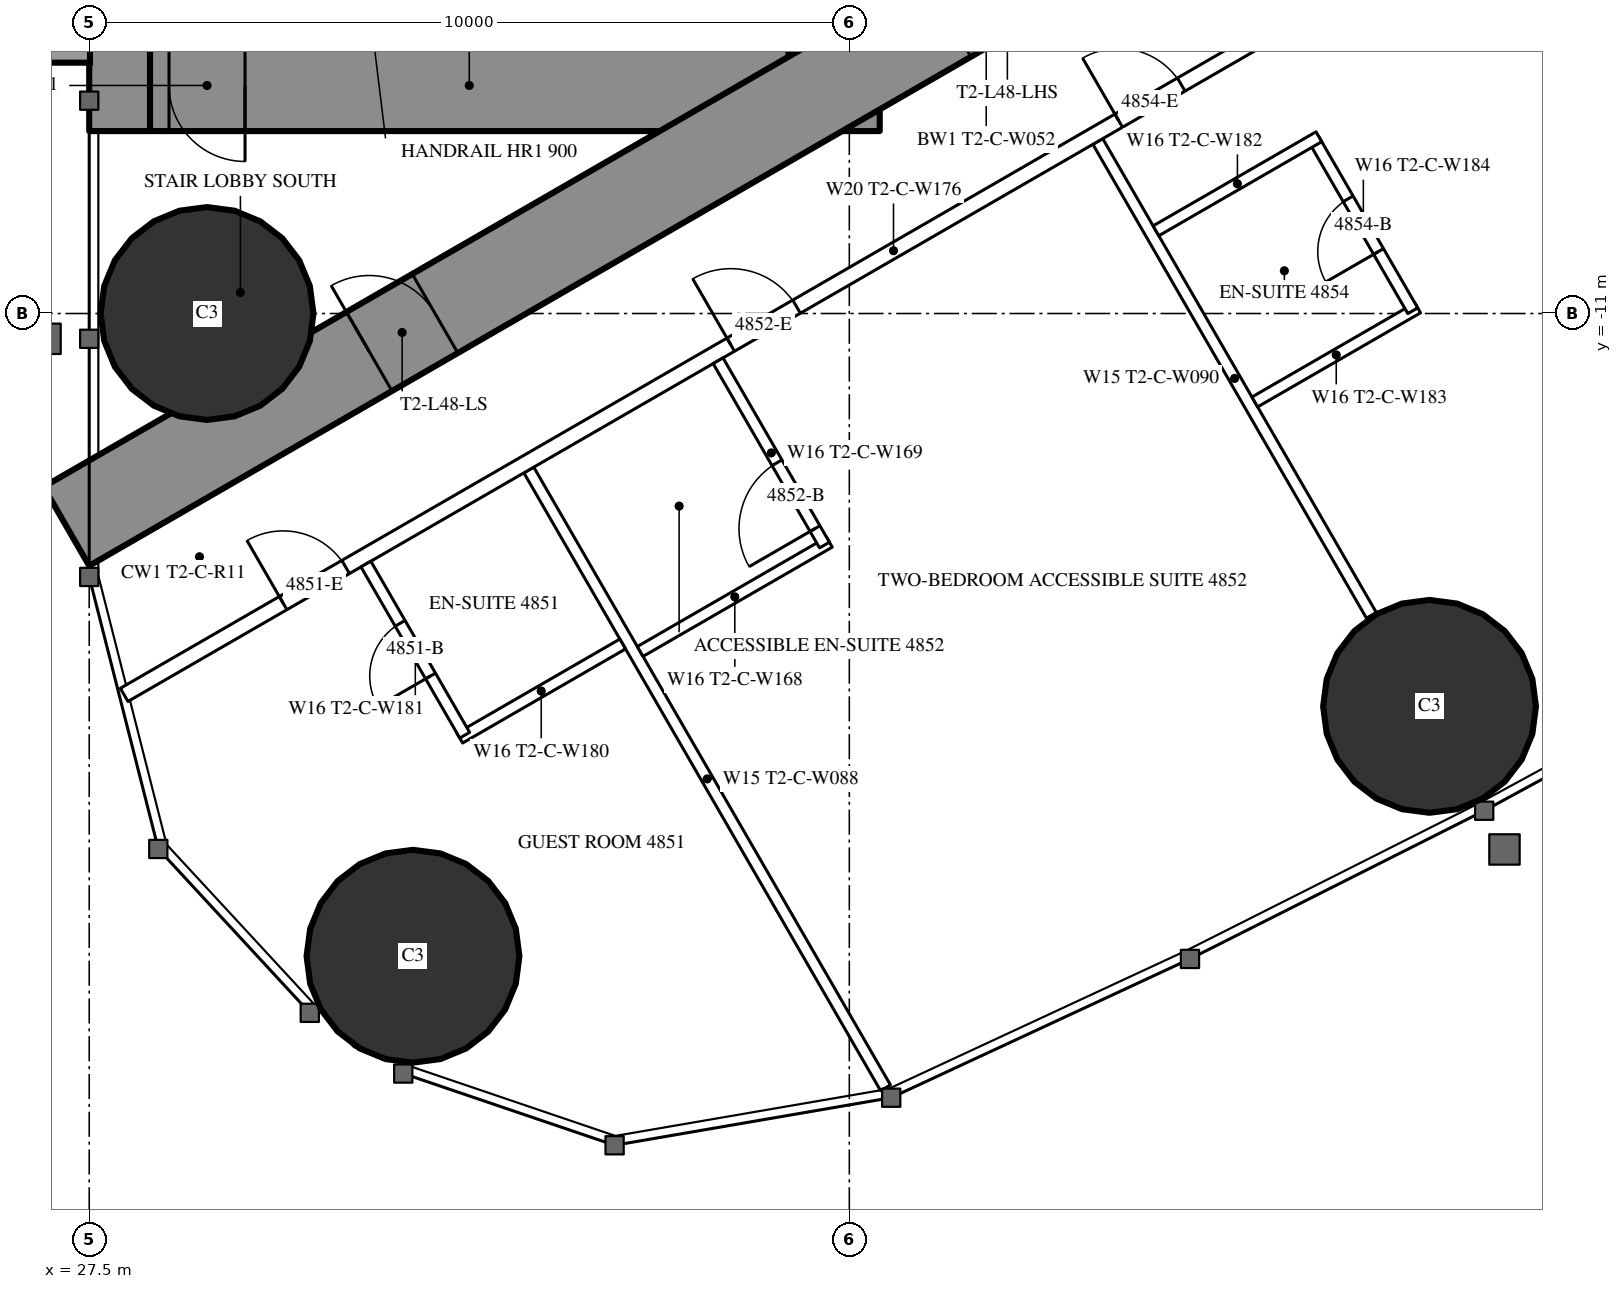
"""IFC4 building model, lengths in metres.
Left out: names, types, materials, properties, quantities, classifications, styles, units other than length and angle.
Written with IfcOpenShell. Run it as: python <this file> out.ifc"""

import sys

from ifc_helpers import new_model, si_unit, direction, frame, frame_2d, origin, origin_2d, place, context, subcontext, project, spatial, rectangle, circle, extrude, element, fill, save


model = new_model("IFC4")
c1 = context("Model", 3, precision=1e-05, world=origin(), true_north=direction((0.0, 1.0)))
c2 = subcontext(c1, "Body", "Model", "MODEL_VIEW")
j1 = project(units=[si_unit("LENGTHUNIT", "METRE"), si_unit("PLANEANGLEUNIT", "RADIAN")], contexts=[c1])
p1 = place(None, origin())
s1 = spatial("IfcSite", under=j1, at=p1, CompositionType="ELEMENT")
p2 = place(p1, origin())
s2 = spatial("IfcBuilding", under=s1, at=p2, CompositionType="ELEMENT")
p3 = place(p2, frame((0.0, 0.0, 180.8)))
s3 = spatial("IfcBuildingStorey", under=s2, at=p3, CompositionType="ELEMENT", Elevation=180.8)
for number, where, z_axis, x_axis in (
    (1, (31.76, -19.456, 0.0), (0.0, 0.0, 1.0), (1.0, 0.0, 0.0)),
    (2, (29.05, -11.0, 0.0), (0.0, 0.0, 1.0), (1.0, 0.0, 0.0)),
    (3, (45.134, -16.168, 0.0), (0.0, 0.0, 1.0), (1.0, 0.0, 0.0)),
):
    element("IfcColumn", number, at=place(p3, frame(where, z_axis=z_axis, x_axis=x_axis)), inside=s3, PredefinedType="COLUMN", context=c2, shape_type="SweptSolid", body=[
        extrude(circle(Radius=1.4, at=origin_2d()), origin(), (0.0, 0.0, 1.0), 3.5),
    ])
p4 = place(p3, frame((27.9, -8.6, 0.0), z_axis=(0.0, 0.0, 1.0), x_axis=(0.0, 1.0, 0.0)))
e4 = element("IfcWall", 4, at=p4, inside=s3, PredefinedType="SHEAR", context=c2, shape_type="SweptSolid", body=[
    extrude(rectangle(XDim=17.2, YDim=0.8, at=frame_2d((8.6, 0.0))), origin(), (0.0, 0.0, 1.0), 3.5),
])
p5 = place(p4, frame((2.45, 0.0, 0.6)))
e5 = element("IfcOpeningElement", 5, at=p5, cuts=e4, PredefinedType="OPENING", context=c2, shape_type="SweptSolid", body=[
    extrude(rectangle(XDim=0.6, YDim=2.1, at=frame_2d((0.3, 1.05))), frame((0.0, 0.41, 0.0), z_axis=(0.0, -1.0, 0.0), x_axis=(1.0, 0.0, 0.0)), (0.0, 0.0, 1.0), 0.82),
])
p6 = place(p4, frame((14.15, 0.0, 0.6)))
e6 = element("IfcOpeningElement", 6, at=p6, cuts=e4, PredefinedType="OPENING", context=c2, shape_type="SweptSolid", body=[
    extrude(rectangle(XDim=0.6, YDim=2.1, at=frame_2d((0.3, 1.05))), frame((0.0, 0.41, 0.0), z_axis=(0.0, -1.0, 0.0), x_axis=(1.0, 0.0, 0.0)), (0.0, 0.0, 1.0), 0.82),
])
p7 = place(p3, frame((37.3, -8.6, 0.0), z_axis=(0.0, 0.0, 1.0), x_axis=(0.0, 1.0, 0.0)))
e7 = element("IfcWall", 7, at=p7, inside=s3, PredefinedType="SHEAR", context=c2, shape_type="SweptSolid", body=[
    extrude(rectangle(XDim=17.2, YDim=1.2, at=frame_2d((8.6, 0.0))), origin(), (0.0, 0.0, 1.0), 3.5),
])
p8 = place(p7, frame((7.7, 0.0, 0.0)))
e8 = element("IfcOpeningElement", 8, at=p8, cuts=e7, PredefinedType="OPENING", context=c2, shape_type="SweptSolid", body=[
    extrude(rectangle(XDim=1.8, YDim=2.2, at=frame_2d((0.9, 1.1))), frame((0.0, 0.61, 0.0), z_axis=(0.0, -1.0, 0.0), x_axis=(1.0, 0.0, 0.0)), (0.0, 0.0, 1.0), 1.22),
])
p9 = place(p3, frame((28.3, -8.0, 0.0), z_axis=(0.0, 0.0, 1.0), x_axis=(1.0, 0.0, 0.0)))
e9 = element("IfcWall", 9, at=p9, inside=s3, PredefinedType="SHEAR", context=c2, shape_type="SweptSolid", body=[
    extrude(rectangle(XDim=8.4, YDim=1.2, at=frame_2d((4.2, 0.0))), origin(), (0.0, 0.0, 1.0), 3.5),
])
p10 = place(p9, frame((0.25, 0.0, 0.0)))
e10 = element("IfcOpeningElement", 10, at=p10, cuts=e9, PredefinedType="OPENING", context=c2, shape_type="SweptSolid", body=[
    extrude(rectangle(XDim=1.0, YDim=2.2, at=frame_2d((0.5, 1.1))), frame((0.0, 0.61, 0.0), z_axis=(0.0, -1.0, 0.0), x_axis=(1.0, 0.0, 0.0)), (0.0, 0.0, 1.0), 1.22),
])
p11 = place(p3, frame((27.2, -13.8, 0.0), z_axis=(0.0, 0.0, 1.0), x_axis=(0.866027159892, 0.499996958321, 0.0)))
e11 = element("IfcWall", 11, at=p11, inside=s3, PredefinedType="SHEAR", context=c2, shape_type="SweptSolid", body=[
    extrude(rectangle(XDim=27.947, YDim=1.2, at=frame_2d((13.973, 0.0))), origin(), (0.0, 0.0, 1.0), 3.5),
])
p12 = place(p11, frame((4.6, 0.0, 0.0)))
e12 = element("IfcOpeningElement", 12, at=p12, cuts=e11, PredefinedType="OPENING", context=c2, shape_type="SweptSolid", body=[
    extrude(rectangle(XDim=1.0, YDim=2.2, at=frame_2d((0.5, 1.1))), frame((0.0, 0.61, 0.0), z_axis=(0.0, -1.0, 0.0), x_axis=(1.0, 0.0, 0.0)), (0.0, 0.0, 1.0), 1.22),
])
p13 = place(p11, frame((13.395, 0.0, 0.0)))
e13 = element("IfcOpeningElement", 13, at=p13, cuts=e11, PredefinedType="OPENING", context=c2, shape_type="SweptSolid", body=[
    extrude(rectangle(XDim=1.8, YDim=2.2, at=frame_2d((0.9, 1.1))), frame((0.0, 0.61, 0.0), z_axis=(0.0, -1.0, 0.0), x_axis=(1.0, 0.0, 0.0)), (0.0, 0.0, 1.0), 1.22),
])
p14 = place(p3, frame((33.284, -13.059, 0.0), z_axis=(0.0, 0.0, 1.0), x_axis=(0.499985904184, -0.866033541855, 0.0)))
e14 = element("IfcWall", 14, at=p14, inside=s3, PredefinedType="PARTITIONING", context=c2, shape_type="SweptSolid", body=[
    extrude(rectangle(XDim=9.385, YDim=0.15, at=frame_2d((4.693, 0.0))), origin(), (0.0, 0.0, 1.0), 3.25),
])
p15 = place(p3, frame((40.769, -8.737, 0.0), z_axis=(0.0, 0.0, 1.0), x_axis=(0.500013115284, -0.866017831539, 0.0)))
e15 = element("IfcWall", 15, at=p15, inside=s3, PredefinedType="PARTITIONING", context=c2, shape_type="SweptSolid", body=[
    extrude(rectangle(XDim=7.198, YDim=0.15, at=frame_2d((3.599, 0.0))), origin(), (0.0, 0.0, 1.0), 2.3),
])
p16 = place(p3, frame((27.959, -16.017, 0.0), z_axis=(0.0, 0.0, 1.0), x_axis=(0.866024180982, 0.50000211795, 0.0)))
e16 = element("IfcWall", 16, at=p16, inside=s3, PredefinedType="PARTITIONING", context=c2, shape_type="SweptSolid", body=[
    extrude(rectangle(XDim=23.375, YDim=0.2, at=frame_2d((11.688, 0.0))), origin(), (0.0, 0.0, 1.0), 3.25),
])
p17 = place(p16, frame((2.415, 0.0, 0.0)))
e17 = element("IfcOpeningElement", 17, at=p17, cuts=e16, PredefinedType="OPENING", context=c2, shape_type="SweptSolid", body=[
    extrude(rectangle(XDim=0.95, YDim=2.2, at=frame_2d((0.475, 1.1))), frame((0.0, 0.11, 0.0), z_axis=(0.0, -1.0, 0.0), x_axis=(1.0, 0.0, 0.0)), (0.0, 0.0, 1.0), 0.22),
])
p18 = place(p16, frame((9.215, 0.0, 0.0)))
e18 = element("IfcOpeningElement", 18, at=p18, cuts=e16, PredefinedType="OPENING", context=c2, shape_type="SweptSolid", body=[
    extrude(rectangle(XDim=1.0, YDim=2.2, at=frame_2d((0.5, 1.1))), frame((0.0, 0.11, 0.0), z_axis=(0.0, -1.0, 0.0), x_axis=(1.0, 0.0, 0.0)), (0.0, 0.0, 1.0), 0.22),
])
p19 = place(p16, frame((15.109, 0.0, 0.0)))
e19 = element("IfcOpeningElement", 19, at=p19, cuts=e16, PredefinedType="OPENING", context=c2, shape_type="SweptSolid", body=[
    extrude(rectangle(XDim=0.95, YDim=2.2, at=frame_2d((0.475, 1.1))), frame((0.0, 0.11, 0.0), z_axis=(0.0, -1.0, 0.0), x_axis=(1.0, 0.0, 0.0)), (0.0, 0.0, 1.0), 0.22),
])
p20 = place(p3, frame((32.375, -16.585, 0.0), z_axis=(0.0, 0.0, 1.0), x_axis=(0.86604923931, 0.499958713387, 0.0)))
e20 = element("IfcWall", 20, at=p20, inside=s3, PredefinedType="PARTITIONING", context=c2, shape_type="SweptSolid", body=[
    extrude(rectangle(XDim=2.475, YDim=0.15, at=frame_2d((1.237, 0.0))), origin(), (0.0, 0.0, 1.0), 3.25),
])
p21 = place(p3, frame((31.14, -14.296, 0.0), z_axis=(0.0, 0.0, 1.0), x_axis=(0.500006934395, -0.866021400173, 0.0)))
e21 = element("IfcWall", 21, at=p21, inside=s3, PredefinedType="PARTITIONING", context=c2, shape_type="SweptSolid", body=[
    extrude(rectangle(XDim=2.6, YDim=0.15, at=frame_2d((1.3, 0.0))), origin(), (0.0, 0.0, 1.0), 3.25),
])
p22 = place(p21, frame((0.9, 0.0, 0.0)))
e22 = element("IfcOpeningElement", 22, at=p22, cuts=e21, PredefinedType="OPENING", context=c2, shape_type="SweptSolid", body=[
    extrude(rectangle(XDim=0.8, YDim=2.2, at=frame_2d((0.4, 1.1))), frame((0.0, 0.085, 0.0), z_axis=(0.0, -1.0, 0.0), x_axis=(1.0, 0.0, 0.0)), (0.0, 0.0, 1.0), 0.17),
])
p23 = place(p3, frame((34.749, -15.446, 0.0), z_axis=(0.0, 0.0, 1.0), x_axis=(0.866018712932, 0.500011588718, 0.0)))
e23 = element("IfcWall", 23, at=p23, inside=s3, PredefinedType="PARTITIONING", context=c2, shape_type="SweptSolid", body=[
    extrude(rectangle(XDim=2.875, YDim=0.15, at=frame_2d((1.438, 0.0))), origin(), (0.0, 0.0, 1.0), 3.25),
])
p24 = place(p3, frame((35.773, -11.621, 0.0), z_axis=(0.0, 0.0, 1.0), x_axis=(0.49998411664, -0.866034573852, 0.0)))
e24 = element("IfcWall", 24, at=p24, inside=s3, PredefinedType="PARTITIONING", context=c2, shape_type="SweptSolid", body=[
    extrude(rectangle(XDim=2.8, YDim=0.15, at=frame_2d((1.4, 0.0))), origin(), (0.0, 0.0, 1.0), 3.25),
])
p25 = place(p24, frame((1.55, 0.0, 0.0)))
e25 = element("IfcOpeningElement", 25, at=p25, cuts=e24, PredefinedType="OPENING", context=c2, shape_type="SweptSolid", body=[
    extrude(rectangle(XDim=1.0, YDim=2.2, at=frame_2d((0.5, 1.1))), frame((0.0, 0.085, 0.0), z_axis=(0.0, -1.0, 0.0), x_axis=(1.0, 0.0, 0.0)), (0.0, 0.0, 1.0), 0.17),
])
p26 = place(p3, frame((42.834, -12.164, 0.0), z_axis=(0.0, 0.0, 1.0), x_axis=(0.866031185235, 0.4999899861, 0.0)))
e26 = element("IfcWall", 26, at=p26, inside=s3, PredefinedType="PARTITIONING", context=c2, shape_type="SweptSolid", body=[
    extrude(rectangle(XDim=2.475, YDim=0.15, at=frame_2d((1.238, 0.0))), origin(), (0.0, 0.0, 1.0), 3.25),
])
p27 = place(p3, frame((43.613, -8.712, 0.0), z_axis=(0.0, 0.0, 1.0), x_axis=(0.500006934395, -0.866021400173, 0.0)))
e27 = element("IfcWall", 27, at=p27, inside=s3, PredefinedType="PARTITIONING", context=c2, shape_type="SweptSolid", body=[
    extrude(rectangle(XDim=2.6, YDim=0.15, at=frame_2d((1.3, 0.0))), origin(), (0.0, 0.0, 1.0), 3.25),
])
p28 = place(p27, frame((0.9, 0.0, 0.0)))
e28 = element("IfcOpeningElement", 28, at=p28, cuts=e27, PredefinedType="OPENING", context=c2, shape_type="SweptSolid", body=[
    extrude(rectangle(XDim=0.8, YDim=2.2, at=frame_2d((0.4, 1.1))), frame((0.0, 0.085, 0.0), z_axis=(0.0, -1.0, 0.0), x_axis=(1.0, 0.0, 0.0)), (0.0, 0.0, 1.0), 0.17),
])
p29 = place(p3, frame((41.534, -9.912, 0.0), z_axis=(0.0, 0.0, 1.0), x_axis=(0.866031185235, 0.4999899861, 0.0)))
e29 = element("IfcWall", 29, at=p29, inside=s3, PredefinedType="PARTITIONING", context=c2, shape_type="SweptSolid", body=[
    extrude(rectangle(XDim=2.475, YDim=0.15, at=frame_2d((1.238, 0.0))), origin(), (0.0, 0.0, 1.0), 3.25),
])
p30 = place(p22, origin())
e30 = element("IfcDoor", 30, at=p30, inside=s3, OperationType="SINGLE_SWING_RIGHT", PredefinedType="DOOR", context=c2, shape_type="SweptSolid", body=[
    extrude(rectangle(XDim=0.8, YDim=2.2, at=frame_2d((0.4, 1.1))), frame((0.0, 0.025, 0.0), z_axis=(0.0, -1.0, 0.0), x_axis=(1.0, 0.0, 0.0)), (0.0, 0.0, 1.0), 0.05),
])
fill(e22, e30)
p31 = place(p17, origin())
e31 = element("IfcDoor", 31, at=p31, inside=s3, OperationType="SINGLE_SWING_LEFT", PredefinedType="DOOR", context=c2, shape_type="SweptSolid", body=[
    extrude(rectangle(XDim=0.95, YDim=2.2, at=frame_2d((0.475, 1.1))), frame((0.0, 0.025, 0.0), z_axis=(0.0, -1.0, 0.0), x_axis=(1.0, 0.0, 0.0)), (0.0, 0.0, 1.0), 0.05),
])
fill(e17, e31)
p32 = place(p25, origin())
e32 = element("IfcDoor", 32, at=p32, inside=s3, OperationType="SINGLE_SWING_RIGHT", PredefinedType="DOOR", context=c2, shape_type="SweptSolid", body=[
    extrude(rectangle(XDim=1.0, YDim=2.2, at=frame_2d((0.5, 1.1))), frame((0.0, 0.025, 0.0), z_axis=(0.0, -1.0, 0.0), x_axis=(1.0, 0.0, 0.0)), (0.0, 0.0, 1.0), 0.05),
])
fill(e25, e32)
p33 = place(p18, origin())
e33 = element("IfcDoor", 33, at=p33, inside=s3, OperationType="SINGLE_SWING_LEFT", PredefinedType="DOOR", context=c2, shape_type="SweptSolid", body=[
    extrude(rectangle(XDim=1.0, YDim=2.2, at=frame_2d((0.5, 1.1))), frame((0.0, 0.025, 0.0), z_axis=(0.0, -1.0, 0.0), x_axis=(1.0, 0.0, 0.0)), (0.0, 0.0, 1.0), 0.05),
])
fill(e18, e33)
p34 = place(p28, origin())
e34 = element("IfcDoor", 34, at=p34, inside=s3, OperationType="SINGLE_SWING_RIGHT", PredefinedType="DOOR", context=c2, shape_type="SweptSolid", body=[
    extrude(rectangle(XDim=0.8, YDim=2.2, at=frame_2d((0.4, 1.1))), frame((0.0, 0.025, 0.0), z_axis=(0.0, -1.0, 0.0), x_axis=(1.0, 0.0, 0.0)), (0.0, 0.0, 1.0), 0.05),
])
fill(e28, e34)
p35 = place(p19, origin())
e35 = element("IfcDoor", 35, at=p35, inside=s3, OperationType="SINGLE_SWING_LEFT", PredefinedType="DOOR", context=c2, shape_type="SweptSolid", body=[
    extrude(rectangle(XDim=0.95, YDim=2.2, at=frame_2d((0.475, 1.1))), frame((0.0, 0.025, 0.0), z_axis=(0.0, -1.0, 0.0), x_axis=(1.0, 0.0, 0.0)), (0.0, 0.0, 1.0), 0.05),
])
fill(e19, e35)
p36 = place(p12, origin())
e36 = element("IfcDoor", 36, at=p36, inside=s3, OperationType="SINGLE_SWING_LEFT", PredefinedType="DOOR", context=c2, shape_type="SweptSolid", body=[
    extrude(rectangle(XDim=1.0, YDim=2.2, at=frame_2d((0.5, 1.1))), frame((0.0, 0.025, 0.0), z_axis=(0.0, -1.0, 0.0), x_axis=(1.0, 0.0, 0.0)), (0.0, 0.0, 1.0), 0.05),
])
fill(e12, e36)
p37 = place(p10, origin())
e37 = element("IfcDoor", 37, at=p37, inside=s3, OperationType="SINGLE_SWING_RIGHT", PredefinedType="DOOR", context=c2, shape_type="SweptSolid", body=[
    extrude(rectangle(XDim=1.0, YDim=2.2, at=frame_2d((0.5, 1.1))), frame((0.0, 0.025, 0.0), z_axis=(0.0, -1.0, 0.0), x_axis=(1.0, 0.0, 0.0)), (0.0, 0.0, 1.0), 0.05),
])
fill(e10, e37)
save(model, sys.argv[1])
